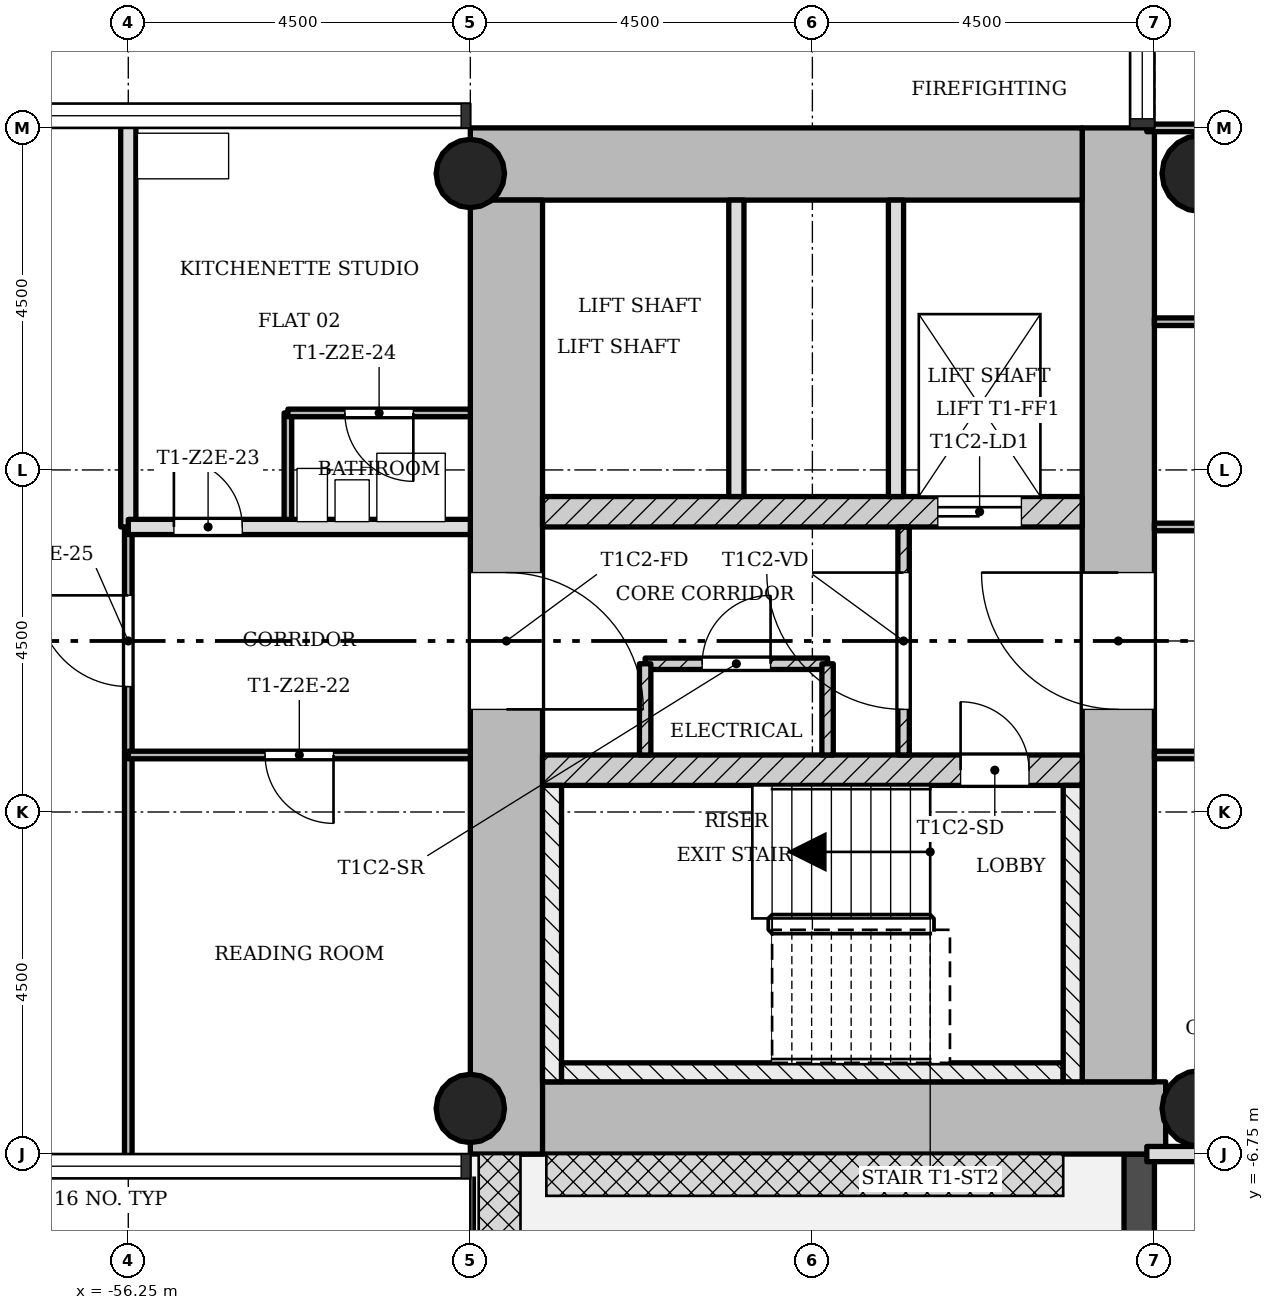
"""IFC4 building model, lengths in metres.
Left out: names, types, materials, properties, quantities, classifications, styles, units other than length and angle.
Written with IfcOpenShell. Run it as: python <this file> out.ifc"""

import sys

from ifc_helpers import new_model, si_unit, direction, frame, frame_2d, origin, origin_2d, place, context, subcontext, project, spatial, rectangle, hollow_circle, extrude, element, fill, save


model = new_model("IFC4")
c1 = context("Model", 3, precision=1e-05, world=origin(), true_north=direction((0.0, 1.0)))
c2 = subcontext(c1, "Body", "Model", "MODEL_VIEW")
j1 = project(units=[si_unit("LENGTHUNIT", "METRE"), si_unit("PLANEANGLEUNIT", "RADIAN")], contexts=[c1])
p1 = place(None, origin())
s1 = spatial("IfcSite", under=j1, at=p1, CompositionType="ELEMENT")
p2 = place(p1, origin())
s2 = spatial("IfcBuilding", under=s1, at=p2, CompositionType="ELEMENT")
p3 = place(p2, frame((0.0, 0.0, 97.0)))
s3 = spatial("IfcBuildingStorey", under=s2, at=p3, CompositionType="ELEMENT", Elevation=97.0)
p4 = place(p3, frame((-51.298, -6.275, 0.0), z_axis=(0.0, 0.0, 1.0), x_axis=(1.0, 0.0, 0.0)))
e1 = element("IfcWall", 1, at=p4, inside=s3, PredefinedType="SHEAR", context=c2, shape_type="SweptSolid", body=[
    extrude(rectangle(XDim=8.696, YDim=0.95, at=frame_2d((4.348, 0.0))), origin(), (0.0, 0.0, 1.0), 3.4),
])
p5 = place(p3, frame((-43.225, -5.8, 0.0), z_axis=(0.0, 0.0, 1.0), x_axis=(0.0, 1.0, 0.0)))
e2 = element("IfcWall", 2, at=p5, inside=s3, PredefinedType="SHEAR", context=c2, shape_type="SweptSolid", body=[
    extrude(rectangle(XDim=12.55, YDim=0.95, at=frame_2d((6.275, 0.0))), origin(), (0.0, 0.0, 1.0), 3.4),
])
p6 = place(p5, frame((4.9, 0.0, 0.0)))
e3 = element("IfcOpeningElement", 3, at=p6, cuts=e2, PredefinedType="OPENING", context=c2, shape_type="SweptSolid", body=[
    extrude(rectangle(XDim=1.8, YDim=2.1, at=frame_2d((0.9, 1.05))), frame((0.0, 0.485, 0.0), z_axis=(0.0, -1.0, 0.0), x_axis=(1.0, 0.0, 0.0)), (0.0, 0.0, 1.0), 0.97),
])
p7 = place(p3, frame((-43.7, 6.275, 0.0), z_axis=(0.0, 0.0, 1.0), x_axis=(-1.0, 0.0, 0.0)))
e4 = element("IfcWall", 4, at=p7, inside=s3, PredefinedType="SHEAR", context=c2, shape_type="SweptSolid", body=[
    extrude(rectangle(XDim=8.05, YDim=0.95, at=frame_2d((4.025, 0.0))), origin(), (0.0, 0.0, 1.0), 3.4),
])
p8 = place(p3, frame((-51.275, 5.8, 0.0), z_axis=(0.0, 0.0, 1.0), x_axis=(0.0, -1.0, 0.0)))
e5 = element("IfcWall", 5, at=p8, inside=s3, PredefinedType="SHEAR", context=c2, shape_type="SweptSolid", body=[
    extrude(rectangle(XDim=12.55, YDim=0.95, at=frame_2d((6.275, 0.0))), origin(), (0.0, 0.0, 1.0), 3.4),
])
p9 = place(p8, frame((4.9, 0.0, 0.0)))
e6 = element("IfcOpeningElement", 6, at=p9, cuts=e5, PredefinedType="OPENING", context=c2, shape_type="SweptSolid", body=[
    extrude(rectangle(XDim=1.8, YDim=2.1, at=frame_2d((0.9, 1.05))), frame((0.0, 0.485, 0.0), z_axis=(0.0, -1.0, 0.0), x_axis=(1.0, 0.0, 0.0)), (0.0, 0.0, 1.0), 0.97),
])
p10 = place(p3, frame((-50.8, -1.7, 0.0), z_axis=(0.0, 0.0, 1.0), x_axis=(1.0, 0.0, 0.0)))
e7 = element("IfcWall", 7, at=p10, inside=s3, PredefinedType="SHEAR", context=c2, shape_type="SweptSolid", body=[
    extrude(rectangle(XDim=7.1, YDim=0.4, at=frame_2d((3.55, 0.0))), origin(), (0.0, 0.0, 1.0), 3.4),
])
p11 = place(p10, frame((5.5, 0.0, 0.0)))
e8 = element("IfcOpeningElement", 8, at=p11, cuts=e7, PredefinedType="OPENING", context=c2, shape_type="SweptSolid", body=[
    extrude(rectangle(XDim=0.9, YDim=2.1, at=frame_2d((0.45, 1.05))), frame((0.0, 0.21, 0.0), z_axis=(0.0, -1.0, 0.0), x_axis=(1.0, 0.0, 0.0)), (0.0, 0.0, 1.0), 0.42),
])
p12 = place(p3, frame((-50.8, 1.7, 0.0), z_axis=(0.0, 0.0, 1.0), x_axis=(1.0, 0.0, 0.0)))
e9 = element("IfcWall", 9, at=p12, inside=s3, PredefinedType="SHEAR", context=c2, shape_type="SweptSolid", body=[
    extrude(rectangle(XDim=7.1, YDim=0.4, at=frame_2d((3.55, 0.0))), origin(), (0.0, 0.0, 1.0), 3.4),
])
p13 = place(p12, frame((5.2, 0.0, 0.0)))
e10 = element("IfcOpeningElement", 10, at=p13, cuts=e9, PredefinedType="OPENING", context=c2, shape_type="SweptSolid", body=[
    extrude(rectangle(XDim=1.1, YDim=2.1, at=frame_2d((0.55, 1.05))), frame((0.0, 0.21, 0.0), z_axis=(0.0, -1.0, 0.0), x_axis=(1.0, 0.0, 0.0)), (0.0, 0.0, 1.0), 0.42),
])
for number, where, z_axis, x_axis in (
    (11, (-51.75, -6.15, 0.0), (0.0, 0.0, 1.0), (1.0, 0.0, 0.0)),
    (12, (-51.75, 6.15, 0.0), (0.0, 0.0, 1.0), (1.0, 0.0, 0.0)),
):
    element("IfcColumn", number, at=place(p3, frame(where, z_axis=z_axis, x_axis=x_axis)), inside=s3, PredefinedType="COLUMN", context=c2, shape_type="SweptSolid", body=[
        extrude(hollow_circle(Radius=0.45, WallThickness=0.032, at=origin_2d()), origin(), (0.0, 0.0, 1.0), 3.4),
    ])
for number, where, z_axis, x_axis in (
    (13, (-42.15, -6.15, 0.0), (0.0, 0.0, 1.0), (1.0, 0.0, 0.0)),
    (14, (-42.15, 6.15, 0.0), (0.0, 0.0, 1.0), (1.0, 0.0, 0.0)),
):
    element("IfcColumn", number, at=place(p3, frame(where, z_axis=z_axis, x_axis=x_axis)), inside=s3, PredefinedType="COLUMN", context=c2, shape_type="SweptSolid", body=[
        extrude(hollow_circle(Radius=0.5, WallThickness=0.036, at=origin_2d()), origin(), (0.0, 0.0, 1.0), 3.4),
    ])
p14 = place(p3, frame((-42.95, -6.75, -0.02), z_axis=(0.0, 0.0, 1.0), x_axis=(0.0, -1.0, 0.0)))
e15 = element("IfcWall", 15, at=p14, inside=s3, PredefinedType="STANDARD", context=c2, shape_type="SweptSolid", body=[
    extrude(rectangle(XDim=4.5, YDim=0.4, at=frame_2d((2.25, 0.0))), origin(), (0.0, 0.0, 1.0), 3.12),
])
p15 = place(p14, frame((1.35, 0.0, 0.02)))
e16 = element("IfcOpeningElement", 16, at=p15, cuts=e15, PredefinedType="OPENING", context=c2, shape_type="SweptSolid", body=[
    extrude(rectangle(XDim=1.8, YDim=2.1, at=frame_2d((0.9, 1.05))), frame((0.0, 0.21, 0.0), z_axis=(0.0, -1.0, 0.0), x_axis=(1.0, 0.0, 0.0)), (0.0, 0.0, 1.0), 0.42),
])
p16 = place(p3, frame((-46.05, 1.5, 0.0), z_axis=(0.0, 0.0, 1.0), x_axis=(0.0, -1.0, 0.0)))
e17 = element("IfcWall", 17, at=p16, inside=s3, PredefinedType="PARTITIONING", context=c2, shape_type="SweptSolid", body=[
    extrude(rectangle(XDim=3.0, YDim=0.15, at=frame_2d((1.5, 0.0))), origin(), (0.0, 0.0, 1.0), 3.0),
])
p17 = place(p16, frame((0.6, 0.0, 0.0)))
e18 = element("IfcOpeningElement", 18, at=p17, cuts=e17, PredefinedType="OPENING", context=c2, shape_type="SweptSolid", body=[
    extrude(rectangle(XDim=1.8, YDim=2.1, at=frame_2d((0.9, 1.05))), frame((0.0, 0.085, 0.0), z_axis=(0.0, -1.0, 0.0), x_axis=(1.0, 0.0, 0.0)), (0.0, 0.0, 1.0), 0.17),
])
for number, where, z_axis, x_axis in (
    (19, (-46.15, 5.8, 0.0), (0.0, 0.0, 1.0), (0.0, -1.0, 0.0)),
    (20, (-48.25, 5.8, 0.0), (0.0, 0.0, 1.0), (0.0, -1.0, 0.0)),
):
    element("IfcWall", number, at=place(p3, frame(where, z_axis=z_axis, x_axis=x_axis)), inside=s3, PredefinedType="SOLIDWALL", context=c2, shape_type="SweptSolid", body=[
        extrude(rectangle(XDim=3.9, YDim=0.2, at=frame_2d((1.95, 0.0))), origin(), (0.0, 0.0, 1.0), 3.0),
    ])
p18 = place(p3, frame((-47.05, -0.3, 0.0), z_axis=(0.0, 0.0, 1.0), x_axis=(-1.0, 0.0, 0.0)))
e21 = element("IfcWall", 21, at=p18, inside=s3, PredefinedType="PARTITIONING", context=c2, shape_type="SweptSolid", body=[
    extrude(rectangle(XDim=2.4, YDim=0.15, at=frame_2d((1.2, 0.0))), origin(), (0.0, 0.0, 1.0), 3.0),
])
p19 = place(p18, frame((0.75, 0.0, 0.0)))
e22 = element("IfcOpeningElement", 22, at=p19, cuts=e21, PredefinedType="OPENING", context=c2, shape_type="SweptSolid", body=[
    extrude(rectangle(XDim=0.9, YDim=2.1, at=frame_2d((0.45, 1.05))), frame((0.0, 0.085, 0.0), z_axis=(0.0, -1.0, 0.0), x_axis=(1.0, 0.0, 0.0)), (0.0, 0.0, 1.0), 0.17),
])
for number, where, z_axis, x_axis in (
    (23, (-47.05, -0.3, 0.0), (0.0, 0.0, 1.0), (0.0, -1.0, 0.0)),
    (24, (-49.45, -0.3, 0.0), (0.0, 0.0, 1.0), (0.0, -1.0, 0.0)),
):
    element("IfcWall", number, at=place(p3, frame(where, z_axis=z_axis, x_axis=x_axis)), inside=s3, PredefinedType="PARTITIONING", context=c2, shape_type="SweptSolid", body=[
        extrude(rectangle(XDim=1.2, YDim=0.15, at=frame_2d((0.6, 0.0))), origin(), (0.0, 0.0, 1.0), 3.0),
    ])
p20 = place(p3, frame((-56.25, -6.85, 0.0), z_axis=(0.0, 0.0, 1.0), x_axis=(0.0, 1.0, 0.0)))
e25 = element("IfcWall", 25, at=p20, inside=s3, PredefinedType="PARTITIONING", context=c2, shape_type="SweptSolid", body=[
    extrude(rectangle(XDim=8.35, YDim=0.1, at=frame_2d((4.175, 0.0))), origin(), (0.0, 0.0, 1.0), 3.0),
])
p21 = place(p20, frame((6.25, 0.0, 0.0)))
e26 = element("IfcOpeningElement", 26, at=p21, cuts=e25, PredefinedType="OPENING", context=c2, shape_type="SweptSolid", body=[
    extrude(rectangle(XDim=1.2, YDim=2.1, at=frame_2d((0.6, 1.05))), frame((0.0, 0.06, 0.0), z_axis=(0.0, -1.0, 0.0), x_axis=(1.0, 0.0, 0.0)), (0.0, 0.0, 1.0), 0.12),
])
p22 = place(p3, frame((-56.25, 1.5, 0.0), z_axis=(0.0, 0.0, 1.0), x_axis=(0.0, 1.0, 0.0)))
e27 = element("IfcWall", 27, at=p22, inside=s3, PredefinedType="SOLIDWALL", context=c2, shape_type="SweptSolid", body=[
    extrude(rectangle(XDim=5.35, YDim=0.2, at=frame_2d((2.675, 0.0))), origin(), (0.0, 0.0, 1.0), 3.0),
])
p23 = place(p3, frame((-54.15, 1.5, 0.0), z_axis=(0.0, 0.0, 1.0), x_axis=(0.0, 1.0, 0.0)))
e28 = element("IfcWall", 28, at=p23, inside=s3, PredefinedType="PARTITIONING", context=c2, shape_type="SweptSolid", body=[
    extrude(rectangle(XDim=1.5, YDim=0.1, at=frame_2d((0.75, 0.0))), origin(), (0.0, 0.0, 1.0), 3.0),
])
p24 = place(p3, frame((-42.85, -6.75, 0.0), z_axis=(0.0, 0.0, 1.0), x_axis=(1.0, 0.0, 0.0)))
e29 = element("IfcWall", 29, at=p24, inside=s3, PredefinedType="SOLIDWALL", context=c2, shape_type="SweptSolid", body=[
    extrude(rectangle(XDim=5.95, YDim=0.2, at=frame_2d((2.975, 0.0))), origin(), (0.0, 0.0, 1.0), 3.0),
])
p25 = place(p3, frame((-56.25, -1.5, 0.0), z_axis=(0.0, 0.0, 1.0), x_axis=(1.0, 0.0, 0.0)))
e30 = element("IfcWall", 30, at=p25, inside=s3, PredefinedType="PARTITIONING", context=c2, shape_type="SweptSolid", body=[
    extrude(rectangle(XDim=4.5, YDim=0.1, at=frame_2d((2.25, 0.0))), origin(), (0.0, 0.0, 1.0), 3.0),
])
p26 = place(p25, frame((1.8, 0.0, 0.0)))
e31 = element("IfcOpeningElement", 31, at=p26, cuts=e30, PredefinedType="OPENING", context=c2, shape_type="SweptSolid", body=[
    extrude(rectangle(XDim=0.9, YDim=2.1, at=frame_2d((0.45, 1.05))), frame((0.0, 0.06, 0.0), z_axis=(0.0, -1.0, 0.0), x_axis=(1.0, 0.0, 0.0)), (0.0, 0.0, 1.0), 0.12),
])
p27 = place(p3, frame((-42.75, -1.5, 0.0), z_axis=(0.0, 0.0, 1.0), x_axis=(1.0, 0.0, 0.0)))
e32 = element("IfcWall", 32, at=p27, inside=s3, PredefinedType="PARTITIONING", context=c2, shape_type="SweptSolid", body=[
    extrude(rectangle(XDim=5.85, YDim=0.1, at=frame_2d((2.925, 0.0))), origin(), (0.0, 0.0, 1.0), 3.0),
])
p28 = place(p27, frame((2.475, 0.0, 0.0)))
e33 = element("IfcOpeningElement", 33, at=p28, cuts=e32, PredefinedType="OPENING", context=c2, shape_type="SweptSolid", body=[
    extrude(rectangle(XDim=0.9, YDim=2.1, at=frame_2d((0.45, 1.05))), frame((0.0, 0.06, 0.0), z_axis=(0.0, -1.0, 0.0), x_axis=(1.0, 0.0, 0.0)), (0.0, 0.0, 1.0), 0.12),
])
p29 = place(p3, frame((-42.75, 1.5, 0.0), z_axis=(0.0, 0.0, 1.0), x_axis=(1.0, 0.0, 0.0)))
e34 = element("IfcWall", 34, at=p29, inside=s3, PredefinedType="PARTITIONING", context=c2, shape_type="SweptSolid", body=[
    extrude(rectangle(XDim=5.85, YDim=0.1, at=frame_2d((2.925, 0.0))), origin(), (0.0, 0.0, 1.0), 3.0),
])
p30 = place(p29, frame((2.475, 0.0, 0.0)))
e35 = element("IfcOpeningElement", 35, at=p30, cuts=e34, PredefinedType="OPENING", context=c2, shape_type="SweptSolid", body=[
    extrude(rectangle(XDim=0.9, YDim=2.1, at=frame_2d((0.45, 1.05))), frame((0.0, 0.06, 0.0), z_axis=(0.0, -1.0, 0.0), x_axis=(1.0, 0.0, 0.0)), (0.0, 0.0, 1.0), 0.12),
])
p31 = place(p3, frame((-56.25, 1.5, 0.0), z_axis=(0.0, 0.0, 1.0), x_axis=(1.0, 0.0, 0.0)))
e36 = element("IfcWall", 36, at=p31, inside=s3, PredefinedType="SOLIDWALL", context=c2, shape_type="SweptSolid", body=[
    extrude(rectangle(XDim=4.5, YDim=0.2, at=frame_2d((2.25, 0.0))), origin(), (0.0, 0.0, 1.0), 3.0),
])
p32 = place(p31, frame((0.6, 0.0, 0.0)))
e37 = element("IfcOpeningElement", 37, at=p32, cuts=e36, PredefinedType="OPENING", context=c2, shape_type="SweptSolid", body=[
    extrude(rectangle(XDim=0.9, YDim=2.1, at=frame_2d((0.45, 1.05))), frame((0.0, 0.11, 0.0), z_axis=(0.0, -1.0, 0.0), x_axis=(1.0, 0.0, 0.0)), (0.0, 0.0, 1.0), 0.22),
])
p33 = place(p3, frame((-54.15, 3.0, 0.0), z_axis=(0.0, 0.0, 1.0), x_axis=(1.0, 0.0, 0.0)))
e38 = element("IfcWall", 38, at=p33, inside=s3, PredefinedType="PARTITIONING", context=c2, shape_type="SweptSolid", body=[
    extrude(rectangle(XDim=2.4, YDim=0.1, at=frame_2d((1.2, 0.0))), origin(), (0.0, 0.0, 1.0), 3.0),
])
p34 = place(p33, frame((0.75, 0.0, 0.0)))
e39 = element("IfcOpeningElement", 39, at=p34, cuts=e38, PredefinedType="OPENING", context=c2, shape_type="SweptSolid", body=[
    extrude(rectangle(XDim=0.9, YDim=2.1, at=frame_2d((0.45, 1.05))), frame((0.0, 0.06, 0.0), z_axis=(0.0, -1.0, 0.0), x_axis=(1.0, 0.0, 0.0)), (0.0, 0.0, 1.0), 0.12),
])
p35 = place(p3, frame((-42.75, 4.2, 0.0), z_axis=(0.0, 0.0, 1.0), x_axis=(1.0, 0.0, 0.0)))
e40 = element("IfcWall", 40, at=p35, inside=s3, PredefinedType="PARTITIONING", context=c2, shape_type="SweptSolid", body=[
    extrude(rectangle(XDim=5.85, YDim=0.1, at=frame_2d((2.925, 0.0))), origin(), (0.0, 0.0, 1.0), 3.0),
])
p36 = place(p3, frame((-42.85, 6.75, 0.0), z_axis=(0.0, 0.0, 1.0), x_axis=(1.0, 0.0, 0.0)))
e41 = element("IfcWall", 41, at=p36, inside=s3, PredefinedType="PARTITIONING", context=c2, shape_type="SweptSolid", body=[
    extrude(rectangle(XDim=5.95, YDim=0.1, at=frame_2d((2.975, 0.0))), origin(), (0.0, 0.0, 1.0), 3.0),
])
p37 = place(p3, frame((-50.675, -1.9, 0.0), z_axis=(0.0, 0.0, 1.0), x_axis=(0.0, -1.0, 0.0)))
e42 = element("IfcWall", 42, at=p37, inside=s3, PredefinedType="SHEAR", context=c2, shape_type="SweptSolid", body=[
    extrude(rectangle(XDim=3.9, YDim=0.25, at=frame_2d((1.95, 0.0))), origin(), (0.0, 0.0, 1.0), 3.4),
])
p38 = place(p3, frame((-43.95, -5.675, 0.0), z_axis=(0.0, 0.0, 1.0), x_axis=(-1.0, 0.0, 0.0)))
e43 = element("IfcWall", 43, at=p38, inside=s3, PredefinedType="SHEAR", context=c2, shape_type="SweptSolid", body=[
    extrude(rectangle(XDim=6.6, YDim=0.25, at=frame_2d((3.3, 0.0))), origin(), (0.0, 0.0, 1.0), 3.4),
])
p39 = place(p3, frame((-43.825, -1.9, 0.0), z_axis=(0.0, 0.0, 1.0), x_axis=(0.0, -1.0, 0.0)))
e44 = element("IfcWall", 44, at=p39, inside=s3, PredefinedType="SHEAR", context=c2, shape_type="SweptSolid", body=[
    extrude(rectangle(XDim=3.9, YDim=0.25, at=frame_2d((1.95, 0.0))), origin(), (0.0, 0.0, 1.0), 3.4),
])
p40 = place(p17, origin())
e45 = element("IfcDoor", 45, at=p40, inside=s3, OperationType="SINGLE_SWING_LEFT", PredefinedType="DOOR", context=c2, shape_type="SweptSolid", body=[
    extrude(rectangle(XDim=1.8, YDim=2.1, at=frame_2d((0.9, 1.05))), frame((0.0, 0.025, 0.0), z_axis=(0.0, -1.0, 0.0), x_axis=(1.0, 0.0, 0.0)), (0.0, 0.0, 1.0), 0.05),
])
fill(e18, e45)
p41 = place(p19, origin())
e46 = element("IfcDoor", 46, at=p41, inside=s3, OperationType="SINGLE_SWING_LEFT", PredefinedType="DOOR", context=c2, shape_type="SweptSolid", body=[
    extrude(rectangle(XDim=0.9, YDim=2.1, at=frame_2d((0.45, 1.05))), frame((0.0, 0.025, 0.0), z_axis=(0.0, -1.0, 0.0), x_axis=(1.0, 0.0, 0.0)), (0.0, 0.0, 1.0), 0.05),
])
fill(e22, e46)
p42 = place(p26, origin())
e47 = element("IfcDoor", 47, at=p42, inside=s3, OperationType="SINGLE_SWING_RIGHT", PredefinedType="DOOR", context=c2, shape_type="SweptSolid", body=[
    extrude(rectangle(XDim=0.9, YDim=2.1, at=frame_2d((0.45, 1.05))), frame((0.0, 0.025, 0.0), z_axis=(0.0, -1.0, 0.0), x_axis=(1.0, 0.0, 0.0)), (0.0, 0.0, 1.0), 0.05),
])
fill(e31, e47)
p43 = place(p32, origin())
e48 = element("IfcDoor", 48, at=p43, inside=s3, OperationType="SINGLE_SWING_RIGHT", PredefinedType="DOOR", context=c2, shape_type="SweptSolid", body=[
    extrude(rectangle(XDim=0.9, YDim=2.1, at=frame_2d((0.45, 1.05))), frame((0.0, 0.025, 0.0), z_axis=(0.0, -1.0, 0.0), x_axis=(1.0, 0.0, 0.0)), (0.0, 0.0, 1.0), 0.05),
])
fill(e37, e48)
p44 = place(p34, origin())
e49 = element("IfcDoor", 49, at=p44, inside=s3, OperationType="SINGLE_SWING_RIGHT", PredefinedType="DOOR", context=c2, shape_type="SweptSolid", body=[
    extrude(rectangle(XDim=0.9, YDim=2.1, at=frame_2d((0.45, 1.05))), frame((0.0, 0.025, 0.0), z_axis=(0.0, -1.0, 0.0), x_axis=(1.0, 0.0, 0.0)), (0.0, 0.0, 1.0), 0.05),
])
fill(e39, e49)
p45 = place(p21, origin())
e50 = element("IfcDoor", 50, at=p45, inside=s3, OperationType="SINGLE_SWING_LEFT", PredefinedType="DOOR", context=c2, shape_type="SweptSolid", body=[
    extrude(rectangle(XDim=1.2, YDim=2.1, at=frame_2d((0.6, 1.05))), frame((0.0, 0.025, 0.0), z_axis=(0.0, -1.0, 0.0), x_axis=(1.0, 0.0, 0.0)), (0.0, 0.0, 1.0), 0.05),
])
fill(e26, e50)
p46 = place(p11, origin())
e51 = element("IfcDoor", 51, at=p46, inside=s3, OperationType="SINGLE_SWING_RIGHT", PredefinedType="DOOR", context=c2, shape_type="SweptSolid", body=[
    extrude(rectangle(XDim=0.9, YDim=2.1, at=frame_2d((0.45, 1.05))), frame((0.0, 0.025, 0.0), z_axis=(0.0, -1.0, 0.0), x_axis=(1.0, 0.0, 0.0)), (0.0, 0.0, 1.0), 0.05),
])
fill(e8, e51)
p47 = place(p13, origin())
e52 = element("IfcDoor", 52, at=p47, inside=s3, OperationType="SLIDING_TO_LEFT", PredefinedType="DOOR", context=c2, shape_type="SweptSolid", body=[
    extrude(rectangle(XDim=1.1, YDim=2.1, at=frame_2d((0.55, 1.05))), frame((0.0, 0.025, 0.0), z_axis=(0.0, -1.0, 0.0), x_axis=(1.0, 0.0, 0.0)), (0.0, 0.0, 1.0), 0.05),
])
fill(e10, e52)
p48 = place(p6, origin())
e53 = element("IfcDoor", 53, at=p48, inside=s3, OperationType="SINGLE_SWING_LEFT", PredefinedType="DOOR", context=c2, shape_type="SweptSolid", body=[
    extrude(rectangle(XDim=1.8, YDim=2.1, at=frame_2d((0.9, 1.05))), frame((0.0, 0.025, 0.0), z_axis=(0.0, -1.0, 0.0), x_axis=(1.0, 0.0, 0.0)), (0.0, 0.0, 1.0), 0.05),
])
fill(e3, e53)
p49 = place(p9, origin())
e54 = element("IfcDoor", 54, at=p49, inside=s3, OperationType="SINGLE_SWING_LEFT", PredefinedType="DOOR", context=c2, shape_type="SweptSolid", body=[
    extrude(rectangle(XDim=1.8, YDim=2.1, at=frame_2d((0.9, 1.05))), frame((0.0, 0.025, 0.0), z_axis=(0.0, -1.0, 0.0), x_axis=(1.0, 0.0, 0.0)), (0.0, 0.0, 1.0), 0.05),
])
fill(e6, e54)
save(model, sys.argv[1])
